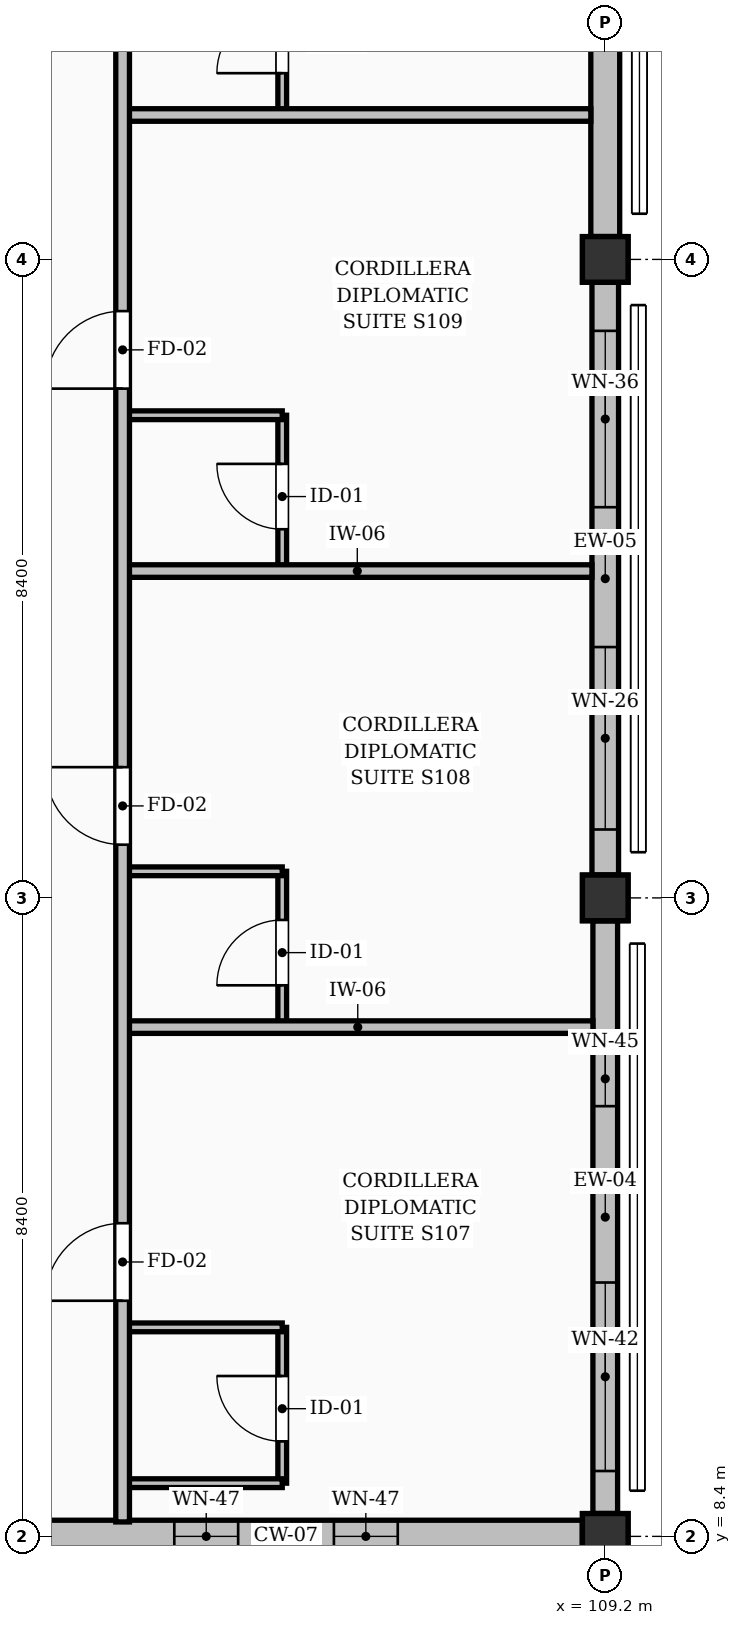
"""IFC4 building model, lengths in metres.
Left out: names, types, materials, properties, quantities, classifications, styles, units other than length and angle.
Written with IfcOpenShell. Run it as: python <this file> out.ifc"""

import sys

from ifc_helpers import new_model, si_unit, direction, frame, frame_2d, origin, origin_2d, place, context, subcontext, project, spatial, rectangle, extrude, element, fill, save


model = new_model("IFC4")
c1 = context("Model", 3, precision=1e-05, world=origin(), true_north=direction((0.0, 1.0)))
c2 = subcontext(c1, "Body", "Model", "MODEL_VIEW")
j1 = project(units=[si_unit("LENGTHUNIT", "METRE"), si_unit("PLANEANGLEUNIT", "RADIAN")], contexts=[c1])
p1 = place(None, origin())
s1 = spatial("IfcSite", under=j1, at=p1, CompositionType="ELEMENT")
p2 = place(p1, origin())
s2 = spatial("IfcBuilding", under=s1, at=p2, CompositionType="ELEMENT")
p3 = place(p2, frame((0.0, 0.0, 3.92)))
s3 = spatial("IfcBuildingStorey", under=s2, at=p3, CompositionType="ELEMENT", Elevation=3.92)
for number, where, z_axis, x_axis in (
    (1, (109.2, 8.4, 0.0), (0.0, 0.0, 1.0), (1.0, 0.0, 0.0)),
    (2, (109.2, 16.8, 0.0), (0.0, 0.0, 1.0), (1.0, 0.0, 0.0)),
    (3, (109.2, 25.2, 0.0), (0.0, 0.0, 1.0), (1.0, 0.0, 0.0)),
):
    element("IfcColumn", number, at=place(p3, frame(where, z_axis=z_axis, x_axis=x_axis)), inside=s3, PredefinedType="COLUMN", context=c2, shape_type="SweptSolid", body=[
        extrude(rectangle(XDim=0.6, YDim=0.6, at=origin_2d()), origin(), (0.0, 0.0, 1.0), 3.64),
    ])
p4 = place(p3, frame((109.2, 8.4, 3.64), z_axis=(0.0, 0.0, 1.0), x_axis=(1.0, 0.0, 0.0)))
e4 = element("IfcColumn", 4, at=p4, inside=s3, PredefinedType="COLUMN", context=c2, shape_type="SweptSolid", body=[
    extrude(rectangle(XDim=0.6, YDim=0.6, at=origin_2d()), origin(), (0.0, 0.0, 1.0), 3.65),
])
p5 = place(p3, frame((109.2, 16.8, 3.64), z_axis=(0.0, 0.0, 1.0), x_axis=(1.0, 0.0, 0.0)))
e5 = element("IfcColumn", 5, at=p5, inside=s3, PredefinedType="COLUMN", context=c2, shape_type="SweptSolid", body=[
    extrude(rectangle(XDim=0.6, YDim=0.6, at=origin_2d()), origin(), (0.0, 0.0, 1.0), 2.419),
])
p6 = place(p3, frame((109.2, 25.2, 3.64), z_axis=(0.0, 0.0, 1.0), x_axis=(1.0, 0.0, 0.0)))
e6 = element("IfcColumn", 6, at=p6, inside=s3, PredefinedType="COLUMN", context=c2, shape_type="SweptSolid", body=[
    extrude(rectangle(XDim=0.6, YDim=0.6, at=origin_2d()), origin(), (0.0, 0.0, 1.0), 1.892),
])
p7 = place(p3, frame((101.101, 8.4, 0.0), z_axis=(0.0, 0.0, 1.0), x_axis=(1.0, 0.0, 0.0)))
e7 = element("IfcWall", 7, at=p7, inside=s3, PredefinedType="SOLIDWALL", context=c2, shape_type="SweptSolid", body=[
    extrude(rectangle(XDim=7.798, YDim=0.425, at=frame_2d((3.899, 0.0))), origin(), (0.0, 0.0, 1.0), 2.445),
])
p8 = place(p7, frame((2.429, 0.0, 0.3)))
e8 = element("IfcOpeningElement", 8, at=p8, cuts=e7, PredefinedType="OPENING", context=c2, shape_type="SweptSolid", body=[
    extrude(rectangle(XDim=0.84, YDim=1.85, at=frame_2d((0.42, 0.925))), frame((0.0, 0.223, 0.0), z_axis=(0.0, -1.0, 0.0), x_axis=(1.0, 0.0, 0.0)), (0.0, 0.0, 1.0), 0.445),
])
p9 = place(p7, frame((4.529, 0.0, 0.3)))
e9 = element("IfcOpeningElement", 9, at=p9, cuts=e7, PredefinedType="OPENING", context=c2, shape_type="SweptSolid", body=[
    extrude(rectangle(XDim=0.84, YDim=1.85, at=frame_2d((0.42, 0.925))), frame((0.0, 0.223, 0.0), z_axis=(0.0, -1.0, 0.0), x_axis=(1.0, 0.0, 0.0)), (0.0, 0.0, 1.0), 0.445),
])
p10 = place(p3, frame((109.2, 8.701, 0.0), z_axis=(0.0, 0.0, 1.0), x_axis=(0.0, 1.0, 0.0)))
e10 = element("IfcWall", 10, at=p10, inside=s3, PredefinedType="SOLIDWALL", context=c2, shape_type="SweptSolid", body=[
    extrude(rectangle(XDim=7.798, YDim=0.325, at=frame_2d((3.899, 0.0))), origin(), (0.0, 0.0, 1.0), 2.734),
])
p11 = place(p10, frame((0.559, 0.0, 0.25)))
e11 = element("IfcOpeningElement", 11, at=p11, cuts=e10, PredefinedType="OPENING", context=c2, shape_type="SweptSolid", body=[
    extrude(rectangle(XDim=2.48, YDim=2.0, at=frame_2d((1.24, 1.0))), frame((0.0, 0.172, 0.0), z_axis=(0.0, -1.0, 0.0), x_axis=(1.0, 0.0, 0.0)), (0.0, 0.0, 1.0), 0.345),
])
p12 = place(p10, frame((5.359, 0.0, 0.25)))
e12 = element("IfcOpeningElement", 12, at=p12, cuts=e10, PredefinedType="OPENING", context=c2, shape_type="SweptSolid", body=[
    extrude(rectangle(XDim=0.72, YDim=1.85, at=frame_2d((0.36, 0.925))), frame((0.0, 0.172, 0.0), z_axis=(0.0, -1.0, 0.0), x_axis=(1.0, 0.0, 0.0)), (0.0, 0.0, 1.0), 0.345),
])
p13 = place(p3, frame((109.2, 17.101, 0.0), z_axis=(0.0, 0.0, 1.0), x_axis=(0.0, 1.0, 0.0)))
e13 = element("IfcWall", 13, at=p13, inside=s3, PredefinedType="SOLIDWALL", context=c2, shape_type="SweptSolid", body=[
    extrude(rectangle(XDim=7.798, YDim=0.35, at=frame_2d((3.899, 0.0))), origin(), (0.0, 0.0, 1.0), 2.734),
])
p14 = place(p13, frame((0.599, 0.0, 0.25)))
e14 = element("IfcOpeningElement", 14, at=p14, cuts=e13, PredefinedType="OPENING", context=c2, shape_type="SweptSolid", body=[
    extrude(rectangle(XDim=2.4, YDim=1.75, at=frame_2d((1.2, 0.875))), frame((0.0, 0.185, 0.0), z_axis=(0.0, -1.0, 0.0), x_axis=(1.0, 0.0, 0.0)), (0.0, 0.0, 1.0), 0.37),
])
p15 = place(p13, frame((4.839, 0.0, 0.25)))
e15 = element("IfcOpeningElement", 15, at=p15, cuts=e13, PredefinedType="OPENING", context=c2, shape_type="SweptSolid", body=[
    extrude(rectangle(XDim=2.32, YDim=1.9, at=frame_2d((1.16, 0.95))), frame((0.0, 0.185, 0.0), z_axis=(0.0, -1.0, 0.0), x_axis=(1.0, 0.0, 0.0)), (0.0, 0.0, 1.0), 0.37),
])
p16 = place(p3, frame((109.2, 25.501, 0.0), z_axis=(0.0, 0.0, 1.0), x_axis=(0.0, 1.0, 0.0)))
e16 = element("IfcWall", 16, at=p16, inside=s3, PredefinedType="SOLIDWALL", context=c2, shape_type="SweptSolid", body=[
    extrude(rectangle(XDim=7.798, YDim=0.38, at=frame_2d((3.899, 0.0))), origin(), (0.0, 0.0, 1.0), 2.734),
])
p17 = place(p16, frame((4.624, 0.0, 0.25)))
e17 = element("IfcOpeningElement", 17, at=p17, cuts=e16, PredefinedType="OPENING", context=c2, shape_type="SweptSolid", body=[
    extrude(rectangle(XDim=2.75, YDim=1.85, at=frame_2d((1.375, 0.925))), frame((0.0, 0.2, 0.0), z_axis=(0.0, -1.0, 0.0), x_axis=(1.0, 0.0, 0.0)), (0.0, 0.0, 1.0), 0.4),
])
p18 = place(p3, frame((104.95, 9.1, 0.0), z_axis=(0.0, 0.0, 1.0), x_axis=(0.0, 1.0, 0.0)))
e18 = element("IfcWall", 18, at=p18, inside=s3, PredefinedType="PARTITIONING", context=c2, shape_type="SweptSolid", body=[
    extrude(rectangle(XDim=2.05, YDim=0.115, at=frame_2d((1.025, 0.0))), origin(), (0.0, 0.0, 1.0), 3.405),
])
p19 = place(p18, frame((0.55, 0.0, 0.0)))
e19 = element("IfcOpeningElement", 19, at=p19, cuts=e18, PredefinedType="OPENING", context=c2, shape_type="SweptSolid", body=[
    extrude(rectangle(XDim=0.86, YDim=2.05, at=frame_2d((0.43, 1.025))), frame((0.0, 0.067, 0.0), z_axis=(0.0, -1.0, 0.0), x_axis=(1.0, 0.0, 0.0)), (0.0, 0.0, 1.0), 0.135),
])
for number, where, z_axis, x_axis in (
    (20, (102.85, 11.15, 0.0), (0.0, 0.0, 1.0), (1.0, 0.0, 0.0)),
    (21, (102.85, 9.1, 0.0), (0.0, 0.0, 1.0), (1.0, 0.0, 0.0)),
):
    element("IfcWall", number, at=place(p3, frame(where, z_axis=z_axis, x_axis=x_axis)), inside=s3, PredefinedType="PARTITIONING", context=c2, shape_type="SweptSolid", body=[
        extrude(rectangle(XDim=2.1, YDim=0.115, at=frame_2d((1.05, 0.0))), origin(), (0.0, 0.0, 1.0), 3.405),
    ])
p20 = place(p3, frame((104.95, 15.1, 0.0), z_axis=(0.0, 0.0, 1.0), x_axis=(0.0, 1.0, 0.0)))
e22 = element("IfcWall", 22, at=p20, inside=s3, PredefinedType="PARTITIONING", context=c2, shape_type="SweptSolid", body=[
    extrude(rectangle(XDim=2.05, YDim=0.115, at=frame_2d((1.025, 0.0))), origin(), (0.0, 0.0, 1.0), 3.405),
])
p21 = place(p20, frame((0.55, 0.0, 0.0)))
e23 = element("IfcOpeningElement", 23, at=p21, cuts=e22, PredefinedType="OPENING", context=c2, shape_type="SweptSolid", body=[
    extrude(rectangle(XDim=0.86, YDim=2.05, at=frame_2d((0.43, 1.025))), frame((0.0, 0.067, 0.0), z_axis=(0.0, -1.0, 0.0), x_axis=(1.0, 0.0, 0.0)), (0.0, 0.0, 1.0), 0.135),
])
p22 = place(p3, frame((102.85, 17.15, 0.0), z_axis=(0.0, 0.0, 1.0), x_axis=(1.0, 0.0, 0.0)))
e24 = element("IfcWall", 24, at=p22, inside=s3, PredefinedType="PARTITIONING", context=c2, shape_type="SweptSolid", body=[
    extrude(rectangle(XDim=2.1, YDim=0.115, at=frame_2d((1.05, 0.0))), origin(), (0.0, 0.0, 1.0), 3.405),
])
p23 = place(p3, frame((102.85, 15.1, 0.0), z_axis=(0.0, 0.0, 1.0), x_axis=(1.0, 0.0, 0.0)))
e25 = element("IfcWall", 25, at=p23, inside=s3, PredefinedType="PARTITIONING", context=c2, shape_type="SweptSolid", body=[
    extrude(rectangle(XDim=6.188, YDim=0.165, at=frame_2d((3.094, 0.0))), origin(), (0.0, 0.0, 1.0), 3.405),
])
p24 = place(p3, frame((104.95, 21.1, 0.0), z_axis=(0.0, 0.0, 1.0), x_axis=(0.0, 1.0, 0.0)))
e26 = element("IfcWall", 26, at=p24, inside=s3, PredefinedType="PARTITIONING", context=c2, shape_type="SweptSolid", body=[
    extrude(rectangle(XDim=2.05, YDim=0.115, at=frame_2d((1.025, 0.0))), origin(), (0.0, 0.0, 1.0), 3.405),
])
p25 = place(p24, frame((0.55, 0.0, 0.0)))
e27 = element("IfcOpeningElement", 27, at=p25, cuts=e26, PredefinedType="OPENING", context=c2, shape_type="SweptSolid", body=[
    extrude(rectangle(XDim=0.86, YDim=2.05, at=frame_2d((0.43, 1.025))), frame((0.0, 0.067, 0.0), z_axis=(0.0, -1.0, 0.0), x_axis=(1.0, 0.0, 0.0)), (0.0, 0.0, 1.0), 0.135),
])
p26 = place(p3, frame((102.85, 23.15, 0.0), z_axis=(0.0, 0.0, 1.0), x_axis=(1.0, 0.0, 0.0)))
e28 = element("IfcWall", 28, at=p26, inside=s3, PredefinedType="PARTITIONING", context=c2, shape_type="SweptSolid", body=[
    extrude(rectangle(XDim=2.1, YDim=0.115, at=frame_2d((1.05, 0.0))), origin(), (0.0, 0.0, 1.0), 3.405),
])
p27 = place(p3, frame((102.85, 21.1, 0.0), z_axis=(0.0, 0.0, 1.0), x_axis=(1.0, 0.0, 0.0)))
e29 = element("IfcWall", 29, at=p27, inside=s3, PredefinedType="PARTITIONING", context=c2, shape_type="SweptSolid", body=[
    extrude(rectangle(XDim=6.175, YDim=0.165, at=frame_2d((3.087, 0.0))), origin(), (0.0, 0.0, 1.0), 3.405),
])
p28 = place(p3, frame((104.95, 27.1, 0.0), z_axis=(0.0, 0.0, 1.0), x_axis=(0.0, 1.0, 0.0)))
e30 = element("IfcWall", 30, at=p28, inside=s3, PredefinedType="PARTITIONING", context=c2, shape_type="SweptSolid", body=[
    extrude(rectangle(XDim=2.05, YDim=0.115, at=frame_2d((1.025, 0.0))), origin(), (0.0, 0.0, 1.0), 3.405),
])
p29 = place(p28, frame((0.55, 0.0, 0.0)))
e31 = element("IfcOpeningElement", 31, at=p29, cuts=e30, PredefinedType="OPENING", context=c2, shape_type="SweptSolid", body=[
    extrude(rectangle(XDim=0.86, YDim=2.05, at=frame_2d((0.43, 1.025))), frame((0.0, 0.067, 0.0), z_axis=(0.0, -1.0, 0.0), x_axis=(1.0, 0.0, 0.0)), (0.0, 0.0, 1.0), 0.135),
])
p30 = place(p3, frame((102.85, 27.1, 0.0), z_axis=(0.0, 0.0, 1.0), x_axis=(1.0, 0.0, 0.0)))
e32 = element("IfcWall", 32, at=p30, inside=s3, PredefinedType="PARTITIONING", context=c2, shape_type="SweptSolid", body=[
    extrude(rectangle(XDim=6.16, YDim=0.165, at=frame_2d((3.08, 0.0))), origin(), (0.0, 0.0, 1.0), 3.405),
])
p31 = place(p3, frame((102.85, 8.59, 0.0), z_axis=(0.0, 0.0, 1.0), x_axis=(0.0, 1.0, 0.0)))
e33 = element("IfcWall", 33, at=p31, inside=s3, PredefinedType="PARTITIONING", context=c2, shape_type="SweptSolid", body=[
    extrude(rectangle(XDim=27.26, YDim=0.18, at=frame_2d((13.63, 0.0))), origin(), (0.0, 0.0, 1.0), 3.405),
])
p32 = place(p31, frame((2.91, 0.0, 0.0)))
e34 = element("IfcOpeningElement", 34, at=p32, cuts=e33, PredefinedType="OPENING", context=c2, shape_type="SweptSolid", body=[
    extrude(rectangle(XDim=1.02, YDim=2.15, at=frame_2d((0.51, 1.075))), frame((0.0, 0.1, 0.0), z_axis=(0.0, -1.0, 0.0), x_axis=(1.0, 0.0, 0.0)), (0.0, 0.0, 1.0), 0.2),
])
p33 = place(p31, frame((8.91, 0.0, 0.0)))
e35 = element("IfcOpeningElement", 35, at=p33, cuts=e33, PredefinedType="OPENING", context=c2, shape_type="SweptSolid", body=[
    extrude(rectangle(XDim=1.02, YDim=2.15, at=frame_2d((0.51, 1.075))), frame((0.0, 0.1, 0.0), z_axis=(0.0, -1.0, 0.0), x_axis=(1.0, 0.0, 0.0)), (0.0, 0.0, 1.0), 0.2),
])
p34 = place(p31, frame((14.91, 0.0, 0.0)))
e36 = element("IfcOpeningElement", 36, at=p34, cuts=e33, PredefinedType="OPENING", context=c2, shape_type="SweptSolid", body=[
    extrude(rectangle(XDim=1.02, YDim=2.15, at=frame_2d((0.51, 1.075))), frame((0.0, 0.1, 0.0), z_axis=(0.0, -1.0, 0.0), x_axis=(1.0, 0.0, 0.0)), (0.0, 0.0, 1.0), 0.2),
])
p35 = place(p31, frame((20.91, 0.0, 0.0)))
e37 = element("IfcOpeningElement", 37, at=p35, cuts=e33, PredefinedType="OPENING", context=c2, shape_type="SweptSolid", body=[
    extrude(rectangle(XDim=1.02, YDim=2.15, at=frame_2d((0.51, 1.075))), frame((0.0, 0.1, 0.0), z_axis=(0.0, -1.0, 0.0), x_axis=(1.0, 0.0, 0.0)), (0.0, 0.0, 1.0), 0.2),
])
p36 = place(p8, origin())
e38 = element("IfcWindow", 38, at=p36, inside=s3, PartitioningType="SINGLE_PANEL", PredefinedType="WINDOW", context=c2, shape_type="SweptSolid", body=[
    extrude(rectangle(XDim=0.84, YDim=1.85, at=frame_2d((0.42, 0.925))), frame((0.0, 0.03, 0.0), z_axis=(0.0, -1.0, 0.0), x_axis=(1.0, 0.0, 0.0)), (0.0, 0.0, 1.0), 0.06),
])
fill(e8, e38)
p37 = place(p9, origin())
e39 = element("IfcWindow", 39, at=p37, inside=s3, PartitioningType="SINGLE_PANEL", PredefinedType="WINDOW", context=c2, shape_type="SweptSolid", body=[
    extrude(rectangle(XDim=0.84, YDim=1.85, at=frame_2d((0.42, 0.925))), frame((0.0, 0.03, 0.0), z_axis=(0.0, -1.0, 0.0), x_axis=(1.0, 0.0, 0.0)), (0.0, 0.0, 1.0), 0.06),
])
fill(e9, e39)
p38 = place(p11, origin())
e40 = element("IfcWindow", 40, at=p38, inside=s3, PartitioningType="DOUBLE_PANEL_VERTICAL", PredefinedType="WINDOW", context=c2, shape_type="SweptSolid", body=[
    extrude(rectangle(XDim=2.48, YDim=2.0, at=frame_2d((1.24, 1.0))), frame((0.0, 0.03, 0.0), z_axis=(0.0, -1.0, 0.0), x_axis=(1.0, 0.0, 0.0)), (0.0, 0.0, 1.0), 0.06),
])
fill(e11, e40)
p39 = place(p12, origin())
e41 = element("IfcWindow", 41, at=p39, inside=s3, PartitioningType="SINGLE_PANEL", PredefinedType="WINDOW", context=c2, shape_type="SweptSolid", body=[
    extrude(rectangle(XDim=0.72, YDim=1.85, at=frame_2d((0.36, 0.925))), frame((0.0, 0.03, 0.0), z_axis=(0.0, -1.0, 0.0), x_axis=(1.0, 0.0, 0.0)), (0.0, 0.0, 1.0), 0.06),
])
fill(e12, e41)
p40 = place(p14, origin())
e42 = element("IfcWindow", 42, at=p40, inside=s3, PartitioningType="DOUBLE_PANEL_VERTICAL", PredefinedType="WINDOW", context=c2, shape_type="SweptSolid", body=[
    extrude(rectangle(XDim=2.4, YDim=1.75, at=frame_2d((1.2, 0.875))), frame((0.0, 0.03, 0.0), z_axis=(0.0, -1.0, 0.0), x_axis=(1.0, 0.0, 0.0)), (0.0, 0.0, 1.0), 0.06),
])
fill(e14, e42)
p41 = place(p15, origin())
e43 = element("IfcWindow", 43, at=p41, inside=s3, PartitioningType="DOUBLE_PANEL_VERTICAL", PredefinedType="WINDOW", context=c2, shape_type="SweptSolid", body=[
    extrude(rectangle(XDim=2.32, YDim=1.9, at=frame_2d((1.16, 0.95))), frame((0.0, 0.03, 0.0), z_axis=(0.0, -1.0, 0.0), x_axis=(1.0, 0.0, 0.0)), (0.0, 0.0, 1.0), 0.06),
])
fill(e15, e43)
p42 = place(p19, origin())
e44 = element("IfcDoor", 44, at=p42, inside=s3, OperationType="SINGLE_SWING_RIGHT", PredefinedType="DOOR", context=c2, shape_type="SweptSolid", body=[
    extrude(rectangle(XDim=0.86, YDim=2.05, at=frame_2d((0.43, 1.025))), frame((0.0, 0.025, 0.0), z_axis=(0.0, -1.0, 0.0), x_axis=(1.0, 0.0, 0.0)), (0.0, 0.0, 1.0), 0.05),
])
fill(e19, e44)
p43 = place(p21, origin())
e45 = element("IfcDoor", 45, at=p43, inside=s3, OperationType="SINGLE_SWING_LEFT", PredefinedType="DOOR", context=c2, shape_type="SweptSolid", body=[
    extrude(rectangle(XDim=0.86, YDim=2.05, at=frame_2d((0.43, 1.025))), frame((0.0, 0.025, 0.0), z_axis=(0.0, -1.0, 0.0), x_axis=(1.0, 0.0, 0.0)), (0.0, 0.0, 1.0), 0.05),
])
fill(e23, e45)
p44 = place(p25, origin())
e46 = element("IfcDoor", 46, at=p44, inside=s3, OperationType="SINGLE_SWING_RIGHT", PredefinedType="DOOR", context=c2, shape_type="SweptSolid", body=[
    extrude(rectangle(XDim=0.86, YDim=2.05, at=frame_2d((0.43, 1.025))), frame((0.0, 0.025, 0.0), z_axis=(0.0, -1.0, 0.0), x_axis=(1.0, 0.0, 0.0)), (0.0, 0.0, 1.0), 0.05),
])
fill(e27, e46)
p45 = place(p29, origin())
e47 = element("IfcDoor", 47, at=p45, inside=s3, OperationType="SINGLE_SWING_LEFT", PredefinedType="DOOR", context=c2, shape_type="SweptSolid", body=[
    extrude(rectangle(XDim=0.86, YDim=2.05, at=frame_2d((0.43, 1.025))), frame((0.0, 0.025, 0.0), z_axis=(0.0, -1.0, 0.0), x_axis=(1.0, 0.0, 0.0)), (0.0, 0.0, 1.0), 0.05),
])
fill(e31, e47)
p46 = place(p32, origin())
e48 = element("IfcDoor", 48, at=p46, inside=s3, OperationType="SINGLE_SWING_LEFT", PredefinedType="DOOR", context=c2, shape_type="SweptSolid", body=[
    extrude(rectangle(XDim=1.02, YDim=2.15, at=frame_2d((0.51, 1.075))), frame((0.0, 0.025, 0.0), z_axis=(0.0, -1.0, 0.0), x_axis=(1.0, 0.0, 0.0)), (0.0, 0.0, 1.0), 0.05),
])
fill(e34, e48)
p47 = place(p33, origin())
e49 = element("IfcDoor", 49, at=p47, inside=s3, OperationType="SINGLE_SWING_RIGHT", PredefinedType="DOOR", context=c2, shape_type="SweptSolid", body=[
    extrude(rectangle(XDim=1.02, YDim=2.15, at=frame_2d((0.51, 1.075))), frame((0.0, 0.025, 0.0), z_axis=(0.0, -1.0, 0.0), x_axis=(1.0, 0.0, 0.0)), (0.0, 0.0, 1.0), 0.05),
])
fill(e35, e49)
p48 = place(p34, origin())
e50 = element("IfcDoor", 50, at=p48, inside=s3, OperationType="SINGLE_SWING_LEFT", PredefinedType="DOOR", context=c2, shape_type="SweptSolid", body=[
    extrude(rectangle(XDim=1.02, YDim=2.15, at=frame_2d((0.51, 1.075))), frame((0.0, 0.025, 0.0), z_axis=(0.0, -1.0, 0.0), x_axis=(1.0, 0.0, 0.0)), (0.0, 0.0, 1.0), 0.05),
])
fill(e36, e50)
save(model, sys.argv[1])
